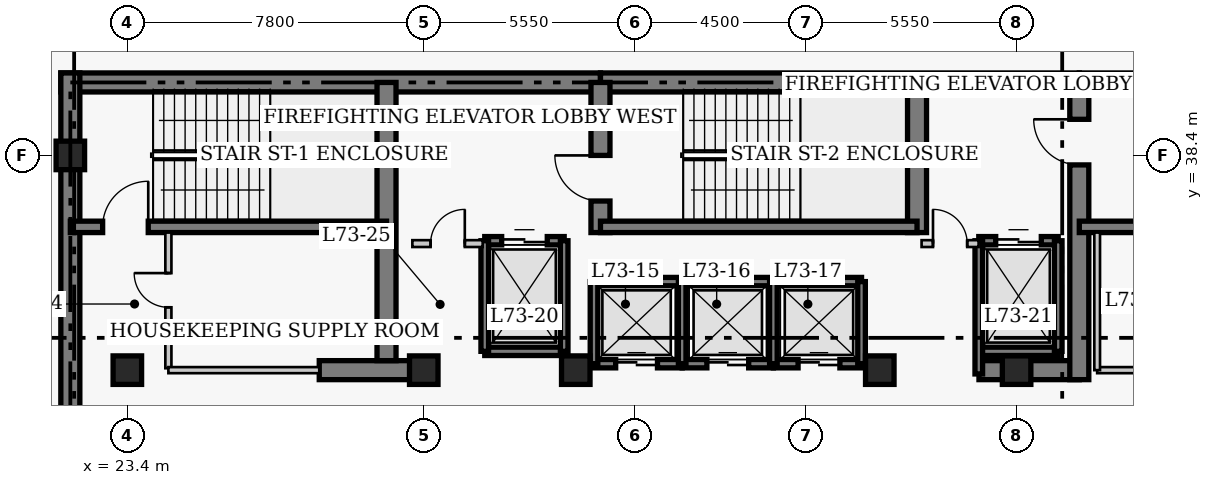
"""IFC4 building model, lengths in metres.
Left out: names, types, materials, properties, quantities, classifications, styles, units other than length and angle.
Written with IfcOpenShell. Run it as: python <this file> out.ifc"""

import sys

from ifc_helpers import new_model, si_unit, direction, frame, frame_2d, origin, origin_2d, place, context, subcontext, project, spatial, rectangle, extrude, element, fill, save


model = new_model("IFC4")
c1 = context("Model", 3, precision=1e-05, world=origin(), true_north=direction((0.0, 1.0)))
c2 = subcontext(c1, "Body", "Model", "MODEL_VIEW")
j1 = project(units=[si_unit("LENGTHUNIT", "METRE"), si_unit("PLANEANGLEUNIT", "RADIAN")], contexts=[c1])
p1 = place(None, origin())
s1 = spatial("IfcSite", under=j1, at=p1, CompositionType="ELEMENT")
p2 = place(p1, origin())
s2 = spatial("IfcBuilding", under=s1, at=p2, CompositionType="ELEMENT")
p3 = place(p2, frame((0.0, 0.0, 293.4)))
s3 = spatial("IfcBuildingStorey", under=s2, at=p3, CompositionType="ELEMENT", Elevation=293.4)
p4 = place(p3, frame((21.65, 40.32, 0.0), z_axis=(0.0, 0.0, 1.0), x_axis=(1.0, 0.0, 0.0)))
e1 = element("IfcWall", 1, at=p4, inside=s3, PredefinedType="SHEAR", context=c2, shape_type="SweptSolid", body=[
    extrude(rectangle(XDim=14.2, YDim=0.5, at=frame_2d((7.1, 0.0))), origin(), (0.0, 0.0, 1.0), 4.0),
])
p5 = place(p3, frame((35.85, 40.32, 0.0), z_axis=(0.0, 0.0, 1.0), x_axis=(1.0, 0.0, 0.0)))
e2 = element("IfcWall", 2, at=p5, inside=s3, PredefinedType="SHEAR", context=c2, shape_type="SweptSolid", body=[
    extrude(rectangle(XDim=12.6, YDim=0.5, at=frame_2d((6.3, 0.0))), origin(), (0.0, 0.0, 1.0), 4.0),
])
p6 = place(p3, frame((48.45, 40.32, 0.0), z_axis=(0.0, 0.0, 1.0), x_axis=(1.0, 0.0, 0.0)))
e3 = element("IfcWall", 3, at=p6, inside=s3, PredefinedType="SHEAR", context=c2, shape_type="SweptSolid", body=[
    extrude(rectangle(XDim=8.57, YDim=0.5, at=frame_2d((4.285, 0.0))), origin(), (0.0, 0.0, 1.0), 4.0),
])
p7 = place(p3, frame((21.9, 27.05, 0.0), z_axis=(0.0, 0.0, 1.0), x_axis=(0.0, 1.0, 0.0)))
e4 = element("IfcWall", 4, at=p7, inside=s3, PredefinedType="SHEAR", context=c2, shape_type="SweptSolid", body=[
    extrude(rectangle(XDim=13.52, YDim=0.5, at=frame_2d((6.76, 0.0))), origin(), (0.0, 0.0, 1.0), 4.0),
])
p8 = place(p3, frame((28.45, 32.75, 0.0), z_axis=(0.0, 0.0, 1.0), x_axis=(1.0, 0.0, 0.0)))
e5 = element("IfcWall", 5, at=p8, inside=s3, PredefinedType="SHEAR", context=c2, shape_type="SweptSolid", body=[
    extrude(rectangle(XDim=2.4, YDim=0.5, at=frame_2d((1.2, 0.0))), origin(), (0.0, 0.0, 1.0), 4.0),
])
p9 = place(p3, frame((45.81, 32.75, 0.0), z_axis=(0.0, 0.0, 1.0), x_axis=(1.0, 0.0, 0.0)))
e6 = element("IfcWall", 6, at=p9, inside=s3, PredefinedType="SHEAR", context=c2, shape_type="SweptSolid", body=[
    extrude(rectangle(XDim=2.64, YDim=0.5, at=frame_2d((1.32, 0.0))), origin(), (0.0, 0.0, 1.0), 4.0),
])
p10 = place(p3, frame((30.22, 33.0, 0.0), z_axis=(0.0, 0.0, 1.0), x_axis=(0.0, 1.0, 0.0)))
e7 = element("IfcWall", 7, at=p10, inside=s3, PredefinedType="SHEAR", context=c2, shape_type="SweptSolid", body=[
    extrude(rectangle(XDim=7.32, YDim=0.5, at=frame_2d((3.66, 0.0))), origin(), (0.0, 0.0, 1.0), 4.0),
])
p11 = place(p3, frame((35.85, 36.37, 0.0), z_axis=(0.0, 0.0, 1.0), x_axis=(0.0, 1.0, 0.0)))
e8 = element("IfcWall", 8, at=p11, inside=s3, PredefinedType="SHEAR", context=c2, shape_type="SweptSolid", body=[
    extrude(rectangle(XDim=3.95, YDim=0.5, at=frame_2d((1.975, 0.0))), origin(), (0.0, 0.0, 1.0), 4.0),
])
p12 = place(p11, frame((0.83, 0.0, 0.0)))
e9 = element("IfcOpeningElement", 9, at=p12, cuts=e8, PredefinedType="OPENING", context=c2, shape_type="SweptSolid", body=[
    extrude(rectangle(XDim=1.2, YDim=2.15, at=frame_2d((0.6, 1.075))), frame((0.0, 0.26, 0.0), z_axis=(0.0, -1.0, 0.0), x_axis=(1.0, 0.0, 0.0)), (0.0, 0.0, 1.0), 0.52),
])
p13 = place(p3, frame((44.18, 36.37, 0.0), z_axis=(0.0, 0.0, 1.0), x_axis=(0.0, 1.0, 0.0)))
e10 = element("IfcWall", 10, at=p13, inside=s3, PredefinedType="SHEAR", context=c2, shape_type="SweptSolid", body=[
    extrude(rectangle(XDim=3.95, YDim=0.5, at=frame_2d((1.975, 0.0))), origin(), (0.0, 0.0, 1.0), 4.0),
])
p14 = place(p3, frame((48.45, 32.5, 0.0), z_axis=(0.0, 0.0, 1.0), x_axis=(0.0, 1.0, 0.0)))
e11 = element("IfcWall", 11, at=p14, inside=s3, PredefinedType="SHEAR", context=c2, shape_type="SweptSolid", body=[
    extrude(rectangle(XDim=7.82, YDim=0.5, at=frame_2d((3.91, 0.0))), origin(), (0.0, 0.0, 1.0), 4.0),
])
p15 = place(p14, frame((5.65, 0.0, 0.0)))
e12 = element("IfcOpeningElement", 12, at=p15, cuts=e11, PredefinedType="OPENING", context=c2, shape_type="SweptSolid", body=[
    extrude(rectangle(XDim=1.2, YDim=2.15, at=frame_2d((0.6, 1.075))), frame((0.0, 0.26, 0.0), z_axis=(0.0, -1.0, 0.0), x_axis=(1.0, 0.0, 0.0)), (0.0, 0.0, 1.0), 0.52),
])
p16 = place(p3, frame((21.9, 36.52, 0.0), z_axis=(0.0, 0.0, 1.0), x_axis=(1.0, 0.0, 0.0)))
e13 = element("IfcWall", 13, at=p16, inside=s3, PredefinedType="SHEAR", context=c2, shape_type="SweptSolid", body=[
    extrude(rectangle(XDim=8.32, YDim=0.3, at=frame_2d((4.16, 0.0))), origin(), (0.0, 0.0, 1.0), 4.0),
])
p17 = place(p16, frame((0.85, 0.0, 0.0)))
e14 = element("IfcOpeningElement", 14, at=p17, cuts=e13, PredefinedType="OPENING", context=c2, shape_type="SweptSolid", body=[
    extrude(rectangle(XDim=1.2, YDim=2.15, at=frame_2d((0.6, 1.075))), frame((0.0, 0.16, 0.0), z_axis=(0.0, -1.0, 0.0), x_axis=(1.0, 0.0, 0.0)), (0.0, 0.0, 1.0), 0.32),
])
p18 = place(p3, frame((35.85, 36.52, 0.0), z_axis=(0.0, 0.0, 1.0), x_axis=(1.0, 0.0, 0.0)))
e15 = element("IfcWall", 15, at=p18, inside=s3, PredefinedType="SHEAR", context=c2, shape_type="SweptSolid", body=[
    extrude(rectangle(XDim=8.33, YDim=0.3, at=frame_2d((4.165, 0.0))), origin(), (0.0, 0.0, 1.0), 4.0),
])
p19 = place(p3, frame((48.45, 36.52, 0.0), z_axis=(0.0, 0.0, 1.0), x_axis=(1.0, 0.0, 0.0)))
e16 = element("IfcWall", 16, at=p19, inside=s3, PredefinedType="SHEAR", context=c2, shape_type="SweptSolid", body=[
    extrude(rectangle(XDim=8.32, YDim=0.3, at=frame_2d((4.16, 0.0))), origin(), (0.0, 0.0, 1.0), 4.0),
])
for number, where, z_axis, x_axis in (
    (17, (21.9, 38.4, 0.0), (0.0, 0.0, 1.0), (1.0, 0.0, 0.0)),
    (18, (23.4, 32.75, 0.0), (0.0, 0.0, 1.0), (1.0, 0.0, 0.0)),
    (19, (31.2, 32.75, 0.0), (0.0, 0.0, 1.0), (1.0, 0.0, 0.0)),
    (20, (35.2, 32.75, 0.0), (0.0, 0.0, 1.0), (1.0, 0.0, 0.0)),
    (21, (43.2, 32.75, 0.0), (0.0, 0.0, 1.0), (1.0, 0.0, 0.0)),
    (22, (46.8, 32.75, 0.0), (0.0, 0.0, 1.0), (1.0, 0.0, 0.0)),
):
    element("IfcColumn", number, at=place(p3, frame(where, z_axis=z_axis, x_axis=x_axis)), inside=s3, PredefinedType="COLUMN", context=c2, shape_type="SweptSolid", body=[
        extrude(rectangle(XDim=0.75, YDim=0.75, at=origin_2d()), origin(), (0.0, 0.0, 1.0), 4.0),
    ])
p20 = place(p3, frame((35.68, 35.08, 0.0), z_axis=(0.0, 0.0, 1.0), x_axis=(1.0, 0.0, 0.0)))
e23 = element("IfcWall", 23, at=p20, inside=s3, PredefinedType="SHEAR", context=c2, shape_type="SweptSolid", body=[
    extrude(rectangle(XDim=2.32, YDim=0.22, at=frame_2d((1.16, 0.0))), origin(), (0.0, 0.0, 1.0), 4.0),
])
p21 = place(p3, frame((35.68, 32.92, 0.0), z_axis=(0.0, 0.0, 1.0), x_axis=(1.0, 0.0, 0.0)))
e24 = element("IfcWall", 24, at=p21, inside=s3, PredefinedType="SHEAR", context=c2, shape_type="SweptSolid", body=[
    extrude(rectangle(XDim=2.32, YDim=0.22, at=frame_2d((1.16, 0.0))), origin(), (0.0, 0.0, 1.0), 4.0),
])
p22 = place(p21, frame((0.57, 0.0, 0.0)))
e25 = element("IfcOpeningElement", 25, at=p22, cuts=e24, PredefinedType="OPENING", context=c2, shape_type="SweptSolid", body=[
    extrude(rectangle(XDim=1.1, YDim=2.15, at=frame_2d((0.55, 1.075))), frame((0.0, 0.12, 0.0), z_axis=(0.0, -1.0, 0.0), x_axis=(1.0, 0.0, 0.0)), (0.0, 0.0, 1.0), 0.24),
])
p23 = place(p3, frame((35.68, 32.92, 0.0), z_axis=(0.0, 0.0, 1.0), x_axis=(0.0, 1.0, 0.0)))
e26 = element("IfcWall", 26, at=p23, inside=s3, PredefinedType="SHEAR", context=c2, shape_type="SweptSolid", body=[
    extrude(rectangle(XDim=2.16, YDim=0.2, at=frame_2d((1.08, 0.0))), origin(), (0.0, 0.0, 1.0), 4.0),
])
p24 = place(p3, frame((38.0, 35.08, 0.0), z_axis=(0.0, 0.0, 1.0), x_axis=(1.0, 0.0, 0.0)))
e27 = element("IfcWall", 27, at=p24, inside=s3, PredefinedType="SHEAR", context=c2, shape_type="SweptSolid", body=[
    extrude(rectangle(XDim=2.4, YDim=0.22, at=frame_2d((1.2, 0.0))), origin(), (0.0, 0.0, 1.0), 4.0),
])
p25 = place(p3, frame((38.0, 32.92, 0.0), z_axis=(0.0, 0.0, 1.0), x_axis=(1.0, 0.0, 0.0)))
e28 = element("IfcWall", 28, at=p25, inside=s3, PredefinedType="SHEAR", context=c2, shape_type="SweptSolid", body=[
    extrude(rectangle(XDim=2.4, YDim=0.22, at=frame_2d((1.2, 0.0))), origin(), (0.0, 0.0, 1.0), 4.0),
])
p26 = place(p25, frame((0.65, 0.0, 0.0)))
e29 = element("IfcOpeningElement", 29, at=p26, cuts=e28, PredefinedType="OPENING", context=c2, shape_type="SweptSolid", body=[
    extrude(rectangle(XDim=1.1, YDim=2.15, at=frame_2d((0.55, 1.075))), frame((0.0, 0.12, 0.0), z_axis=(0.0, -1.0, 0.0), x_axis=(1.0, 0.0, 0.0)), (0.0, 0.0, 1.0), 0.24),
])
p27 = place(p3, frame((38.0, 32.92, 0.0), z_axis=(0.0, 0.0, 1.0), x_axis=(0.0, 1.0, 0.0)))
e30 = element("IfcWall", 30, at=p27, inside=s3, PredefinedType="SHEAR", context=c2, shape_type="SweptSolid", body=[
    extrude(rectangle(XDim=2.16, YDim=0.2, at=frame_2d((1.08, 0.0))), origin(), (0.0, 0.0, 1.0), 4.0),
])
p28 = place(p3, frame((40.4, 35.08, 0.0), z_axis=(0.0, 0.0, 1.0), x_axis=(1.0, 0.0, 0.0)))
e31 = element("IfcWall", 31, at=p28, inside=s3, PredefinedType="SHEAR", context=c2, shape_type="SweptSolid", body=[
    extrude(rectangle(XDim=2.32, YDim=0.22, at=frame_2d((1.16, 0.0))), origin(), (0.0, 0.0, 1.0), 4.0),
])
p29 = place(p3, frame((40.4, 32.92, 0.0), z_axis=(0.0, 0.0, 1.0), x_axis=(1.0, 0.0, 0.0)))
e32 = element("IfcWall", 32, at=p29, inside=s3, PredefinedType="SHEAR", context=c2, shape_type="SweptSolid", body=[
    extrude(rectangle(XDim=2.32, YDim=0.22, at=frame_2d((1.16, 0.0))), origin(), (0.0, 0.0, 1.0), 4.0),
])
p30 = place(p29, frame((0.65, 0.0, 0.0)))
e33 = element("IfcOpeningElement", 33, at=p30, cuts=e32, PredefinedType="OPENING", context=c2, shape_type="SweptSolid", body=[
    extrude(rectangle(XDim=1.1, YDim=2.15, at=frame_2d((0.55, 1.075))), frame((0.0, 0.12, 0.0), z_axis=(0.0, -1.0, 0.0), x_axis=(1.0, 0.0, 0.0)), (0.0, 0.0, 1.0), 0.24),
])
for number, where, z_axis, x_axis in (
    (34, (40.4, 32.92, 0.0), (0.0, 0.0, 1.0), (0.0, 1.0, 0.0)),
    (35, (42.72, 32.92, 0.0), (0.0, 0.0, 1.0), (0.0, 1.0, 0.0)),
):
    element("IfcWall", number, at=place(p3, frame(where, z_axis=z_axis, x_axis=x_axis)), inside=s3, PredefinedType="SHEAR", context=c2, shape_type="SweptSolid", body=[
        extrude(rectangle(XDim=2.16, YDim=0.2, at=frame_2d((1.08, 0.0))), origin(), (0.0, 0.0, 1.0), 4.0),
    ])
p31 = place(p3, frame((32.805, 36.155, 0.0), z_axis=(0.0, 0.0, 1.0), x_axis=(1.0, 0.0, 0.0)))
e36 = element("IfcWall", 36, at=p31, inside=s3, PredefinedType="SHEAR", context=c2, shape_type="SweptSolid", body=[
    extrude(rectangle(XDim=2.09, YDim=0.22, at=frame_2d((1.045, 0.0))), origin(), (0.0, 0.0, 1.0), 4.0),
])
p32 = place(p31, frame((0.445, 0.0, 0.0)))
e37 = element("IfcOpeningElement", 37, at=p32, cuts=e36, PredefinedType="OPENING", context=c2, shape_type="SweptSolid", body=[
    extrude(rectangle(XDim=1.2, YDim=2.15, at=frame_2d((0.6, 1.075))), frame((0.0, 0.12, 0.0), z_axis=(0.0, -1.0, 0.0), x_axis=(1.0, 0.0, 0.0)), (0.0, 0.0, 1.0), 0.24),
])
p33 = place(p3, frame((32.805, 33.245, 0.0), z_axis=(0.0, 0.0, 1.0), x_axis=(1.0, 0.0, 0.0)))
e38 = element("IfcWall", 38, at=p33, inside=s3, PredefinedType="SHEAR", context=c2, shape_type="SweptSolid", body=[
    extrude(rectangle(XDim=2.09, YDim=0.22, at=frame_2d((1.045, 0.0))), origin(), (0.0, 0.0, 1.0), 4.0),
])
for number, where, z_axis, x_axis in (
    (39, (32.805, 33.245, 0.0), (0.0, 0.0, 1.0), (0.0, 1.0, 0.0)),
    (40, (34.895, 33.245, 0.0), (0.0, 0.0, 1.0), (0.0, 1.0, 0.0)),
):
    element("IfcWall", number, at=place(p3, frame(where, z_axis=z_axis, x_axis=x_axis)), inside=s3, PredefinedType="SHEAR", context=c2, shape_type="SweptSolid", body=[
        extrude(rectangle(XDim=2.91, YDim=0.2, at=frame_2d((1.455, 0.0))), origin(), (0.0, 0.0, 1.0), 4.0),
    ])
p34 = place(p3, frame((45.805, 36.155, 0.0), z_axis=(0.0, 0.0, 1.0), x_axis=(1.0, 0.0, 0.0)))
e41 = element("IfcWall", 41, at=p34, inside=s3, PredefinedType="SHEAR", context=c2, shape_type="SweptSolid", body=[
    extrude(rectangle(XDim=2.09, YDim=0.22, at=frame_2d((1.045, 0.0))), origin(), (0.0, 0.0, 1.0), 4.0),
])
p35 = place(p34, frame((0.445, 0.0, 0.0)))
e42 = element("IfcOpeningElement", 42, at=p35, cuts=e41, PredefinedType="OPENING", context=c2, shape_type="SweptSolid", body=[
    extrude(rectangle(XDim=1.2, YDim=2.15, at=frame_2d((0.6, 1.075))), frame((0.0, 0.12, 0.0), z_axis=(0.0, -1.0, 0.0), x_axis=(1.0, 0.0, 0.0)), (0.0, 0.0, 1.0), 0.24),
])
p36 = place(p3, frame((45.805, 33.245, 0.0), z_axis=(0.0, 0.0, 1.0), x_axis=(1.0, 0.0, 0.0)))
e43 = element("IfcWall", 43, at=p36, inside=s3, PredefinedType="SHEAR", context=c2, shape_type="SweptSolid", body=[
    extrude(rectangle(XDim=2.09, YDim=0.22, at=frame_2d((1.045, 0.0))), origin(), (0.0, 0.0, 1.0), 4.0),
])
p37 = place(p3, frame((45.805, 32.65, 0.0), z_axis=(0.0, 0.0, 1.0), x_axis=(0.0, 1.0, 0.0)))
e44 = element("IfcWall", 44, at=p37, inside=s3, PredefinedType="SHEAR", context=c2, shape_type="SweptSolid", body=[
    extrude(rectangle(XDim=3.505, YDim=0.2, at=frame_2d((1.752, 0.0))), origin(), (0.0, 0.0, 1.0), 4.0),
])
p38 = place(p3, frame((47.895, 33.245, 0.0), z_axis=(0.0, 0.0, 1.0), x_axis=(0.0, 1.0, 0.0)))
e45 = element("IfcWall", 45, at=p38, inside=s3, PredefinedType="SHEAR", context=c2, shape_type="SweptSolid", body=[
    extrude(rectangle(XDim=2.91, YDim=0.2, at=frame_2d((1.455, 0.0))), origin(), (0.0, 0.0, 1.0), 4.0),
])
p39 = place(p3, frame((30.9, 36.08, 0.0), z_axis=(0.0, 0.0, 1.0), x_axis=(1.0, 0.0, 0.0)))
e46 = element("IfcWall", 46, at=p39, inside=s3, PredefinedType="PARTITIONING", context=c2, shape_type="SweptSolid", body=[
    extrude(rectangle(XDim=1.85, YDim=0.18, at=frame_2d((0.925, 0.0))), origin(), (0.0, 0.0, 1.0), 3.71),
])
p40 = place(p39, frame((0.48, 0.0, 0.0)))
e47 = element("IfcOpeningElement", 47, at=p40, cuts=e46, PredefinedType="OPENING", context=c2, shape_type="SweptSolid", body=[
    extrude(rectangle(XDim=0.9, YDim=2.15, at=frame_2d((0.45, 1.075))), frame((0.0, 0.1, 0.0), z_axis=(0.0, -1.0, 0.0), x_axis=(1.0, 0.0, 0.0)), (0.0, 0.0, 1.0), 0.2),
])
p41 = place(p3, frame((44.3, 36.08, 0.0), z_axis=(0.0, 0.0, 1.0), x_axis=(1.0, 0.0, 0.0)))
e48 = element("IfcWall", 48, at=p41, inside=s3, PredefinedType="PARTITIONING", context=c2, shape_type="SweptSolid", body=[
    extrude(rectangle(XDim=1.5, YDim=0.18, at=frame_2d((0.75, 0.0))), origin(), (0.0, 0.0, 1.0), 3.71),
])
p42 = place(p41, frame((0.3, 0.0, 0.0)))
e49 = element("IfcOpeningElement", 49, at=p42, cuts=e48, PredefinedType="OPENING", context=c2, shape_type="SweptSolid", body=[
    extrude(rectangle(XDim=0.9, YDim=2.15, at=frame_2d((0.45, 1.075))), frame((0.0, 0.1, 0.0), z_axis=(0.0, -1.0, 0.0), x_axis=(1.0, 0.0, 0.0)), (0.0, 0.0, 1.0), 0.2),
])
p43 = place(p3, frame((24.48, 32.8, 0.0), z_axis=(0.0, 0.0, 1.0), x_axis=(0.0, 1.0, 0.0)))
e50 = element("IfcWall", 50, at=p43, inside=s3, PredefinedType="PARTITIONING", context=c2, shape_type="SweptSolid", body=[
    extrude(rectangle(XDim=3.57, YDim=0.16, at=frame_2d((1.785, 0.0))), origin(), (0.0, 0.0, 1.0), 3.71),
])
p44 = place(p43, frame((1.604, 0.0, 0.0)))
e51 = element("IfcOpeningElement", 51, at=p44, cuts=e50, PredefinedType="OPENING", context=c2, shape_type="SweptSolid", body=[
    extrude(rectangle(XDim=0.9, YDim=2.1, at=frame_2d((0.45, 1.05))), frame((0.0, 0.09, 0.0), z_axis=(0.0, -1.0, 0.0), x_axis=(1.0, 0.0, 0.0)), (0.0, 0.0, 1.0), 0.18),
])
p45 = place(p3, frame((24.48, 32.75, 0.0), z_axis=(0.0, 0.0, 1.0), x_axis=(1.0, 0.0, 0.0)))
e52 = element("IfcWall", 52, at=p45, inside=s3, PredefinedType="PARTITIONING", context=c2, shape_type="SweptSolid", body=[
    extrude(rectangle(XDim=3.97, YDim=0.16, at=frame_2d((1.985, 0.0))), origin(), (0.0, 0.0, 1.0), 3.71),
])
p46 = place(p3, frame((48.92, 32.75, 0.0), z_axis=(0.0, 0.0, 1.0), x_axis=(1.0, 0.0, 0.0)))
e53 = element("IfcWall", 53, at=p46, inside=s3, PredefinedType="PARTITIONING", context=c2, shape_type="SweptSolid", body=[
    extrude(rectangle(XDim=2.2, YDim=0.16, at=frame_2d((1.1, 0.0))), origin(), (0.0, 0.0, 1.0), 3.71),
])
p47 = place(p3, frame((48.92, 32.75, 0.0), z_axis=(0.0, 0.0, 1.0), x_axis=(0.0, 1.0, 0.0)))
e54 = element("IfcWall", 54, at=p47, inside=s3, PredefinedType="PARTITIONING", context=c2, shape_type="SweptSolid", body=[
    extrude(rectangle(XDim=3.62, YDim=0.15, at=frame_2d((1.81, 0.0))), origin(), (0.0, 0.0, 1.0), 3.71),
])
p48 = place(p22, origin())
e55 = element("IfcDoor", 55, at=p48, inside=s3, OperationType="DOUBLE_DOOR_SLIDING", PredefinedType="DOOR", context=c2, shape_type="SweptSolid", body=[
    extrude(rectangle(XDim=1.1, YDim=2.15, at=frame_2d((0.55, 1.075))), frame((0.0, 0.025, 0.0), z_axis=(0.0, -1.0, 0.0), x_axis=(1.0, 0.0, 0.0)), (0.0, 0.0, 1.0), 0.05),
])
fill(e25, e55)
p49 = place(p26, origin())
e56 = element("IfcDoor", 56, at=p49, inside=s3, OperationType="DOUBLE_DOOR_SLIDING", PredefinedType="DOOR", context=c2, shape_type="SweptSolid", body=[
    extrude(rectangle(XDim=1.1, YDim=2.15, at=frame_2d((0.55, 1.075))), frame((0.0, 0.025, 0.0), z_axis=(0.0, -1.0, 0.0), x_axis=(1.0, 0.0, 0.0)), (0.0, 0.0, 1.0), 0.05),
])
fill(e29, e56)
p50 = place(p30, origin())
e57 = element("IfcDoor", 57, at=p50, inside=s3, OperationType="DOUBLE_DOOR_SLIDING", PredefinedType="DOOR", context=c2, shape_type="SweptSolid", body=[
    extrude(rectangle(XDim=1.1, YDim=2.15, at=frame_2d((0.55, 1.075))), frame((0.0, 0.025, 0.0), z_axis=(0.0, -1.0, 0.0), x_axis=(1.0, 0.0, 0.0)), (0.0, 0.0, 1.0), 0.05),
])
fill(e33, e57)
p51 = place(p32, origin())
e58 = element("IfcDoor", 58, at=p51, inside=s3, OperationType="DOUBLE_DOOR_SLIDING", PredefinedType="DOOR", context=c2, shape_type="SweptSolid", body=[
    extrude(rectangle(XDim=1.2, YDim=2.15, at=frame_2d((0.6, 1.075))), frame((0.0, 0.025, 0.0), z_axis=(0.0, -1.0, 0.0), x_axis=(1.0, 0.0, 0.0)), (0.0, 0.0, 1.0), 0.05),
])
fill(e37, e58)
p52 = place(p35, origin())
e59 = element("IfcDoor", 59, at=p52, inside=s3, OperationType="DOUBLE_DOOR_SLIDING", PredefinedType="DOOR", context=c2, shape_type="SweptSolid", body=[
    extrude(rectangle(XDim=1.2, YDim=2.15, at=frame_2d((0.6, 1.075))), frame((0.0, 0.025, 0.0), z_axis=(0.0, -1.0, 0.0), x_axis=(1.0, 0.0, 0.0)), (0.0, 0.0, 1.0), 0.05),
])
fill(e42, e59)
p53 = place(p40, origin())
e60 = element("IfcDoor", 60, at=p53, inside=s3, OperationType="SINGLE_SWING_RIGHT", PredefinedType="DOOR", context=c2, shape_type="SweptSolid", body=[
    extrude(rectangle(XDim=0.9, YDim=2.15, at=frame_2d((0.45, 1.075))), frame((0.0, 0.025, 0.0), z_axis=(0.0, -1.0, 0.0), x_axis=(1.0, 0.0, 0.0)), (0.0, 0.0, 1.0), 0.05),
])
fill(e47, e60)
p54 = place(p42, origin())
e61 = element("IfcDoor", 61, at=p54, inside=s3, OperationType="SINGLE_SWING_LEFT", PredefinedType="DOOR", context=c2, shape_type="SweptSolid", body=[
    extrude(rectangle(XDim=0.9, YDim=2.15, at=frame_2d((0.45, 1.075))), frame((0.0, 0.025, 0.0), z_axis=(0.0, -1.0, 0.0), x_axis=(1.0, 0.0, 0.0)), (0.0, 0.0, 1.0), 0.05),
])
fill(e49, e61)
p55 = place(p44, origin())
e62 = element("IfcDoor", 62, at=p55, inside=s3, OperationType="SINGLE_SWING_RIGHT", PredefinedType="DOOR", context=c2, shape_type="SweptSolid", body=[
    extrude(rectangle(XDim=0.9, YDim=2.1, at=frame_2d((0.45, 1.05))), frame((0.0, 0.025, 0.0), z_axis=(0.0, -1.0, 0.0), x_axis=(1.0, 0.0, 0.0)), (0.0, 0.0, 1.0), 0.05),
])
fill(e51, e62)
p56 = place(p17, origin())
e63 = element("IfcDoor", 63, at=p56, inside=s3, OperationType="SINGLE_SWING_RIGHT", PredefinedType="DOOR", context=c2, shape_type="SweptSolid", body=[
    extrude(rectangle(XDim=1.2, YDim=2.15, at=frame_2d((0.6, 1.075))), frame((0.0, 0.025, 0.0), z_axis=(0.0, -1.0, 0.0), x_axis=(1.0, 0.0, 0.0)), (0.0, 0.0, 1.0), 0.05),
])
fill(e14, e63)
p57 = place(p12, origin())
e64 = element("IfcDoor", 64, at=p57, inside=s3, OperationType="SINGLE_SWING_RIGHT", PredefinedType="DOOR", context=c2, shape_type="SweptSolid", body=[
    extrude(rectangle(XDim=1.2, YDim=2.15, at=frame_2d((0.6, 1.075))), frame((0.0, 0.025, 0.0), z_axis=(0.0, -1.0, 0.0), x_axis=(1.0, 0.0, 0.0)), (0.0, 0.0, 1.0), 0.05),
])
fill(e9, e64)
p58 = place(p15, origin())
e65 = element("IfcDoor", 65, at=p58, inside=s3, OperationType="SINGLE_SWING_RIGHT", PredefinedType="DOOR", context=c2, shape_type="SweptSolid", body=[
    extrude(rectangle(XDim=1.2, YDim=2.15, at=frame_2d((0.6, 1.075))), frame((0.0, 0.025, 0.0), z_axis=(0.0, -1.0, 0.0), x_axis=(1.0, 0.0, 0.0)), (0.0, 0.0, 1.0), 0.05),
])
fill(e12, e65)
save(model, sys.argv[1])
